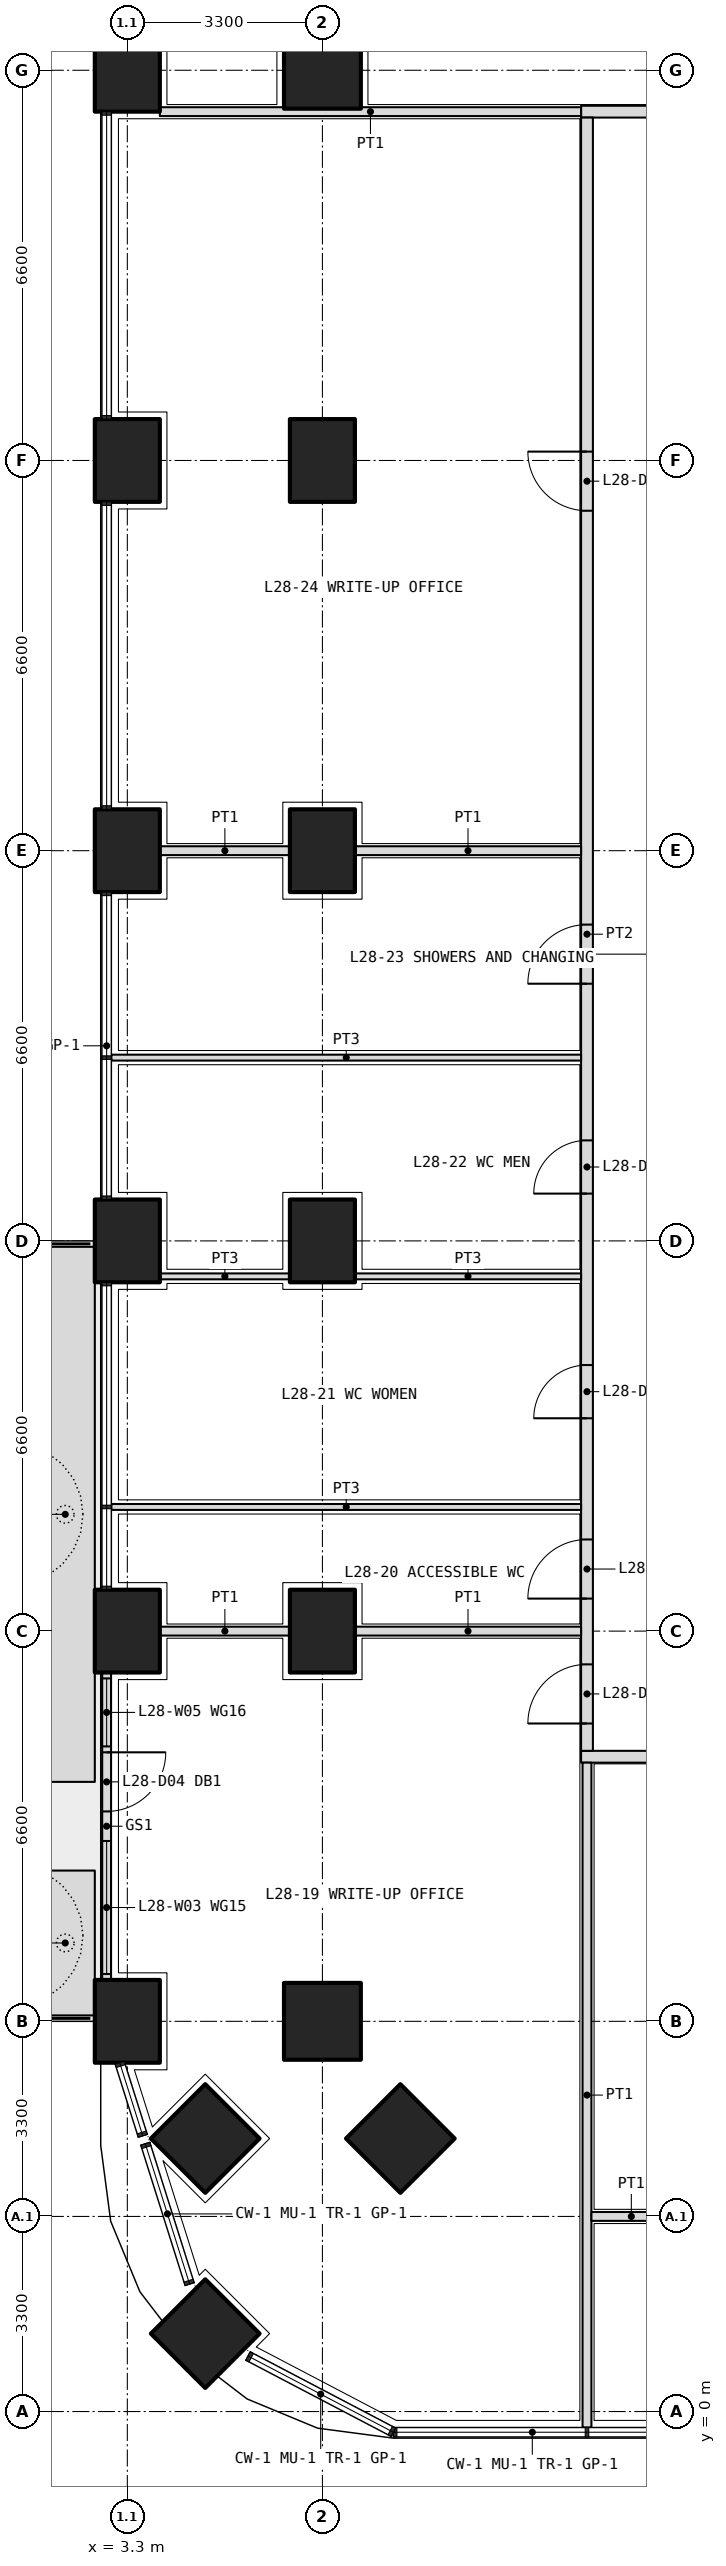
"""IFC4 building model, lengths in metres.
Left out: names, types, materials, properties, quantities, classifications, styles, units other than length and angle.
Written with IfcOpenShell. Run it as: python <this file> out.ifc"""

import sys

from ifc_helpers import new_model, si_unit, direction, frame, frame_2d, origin, origin_2d, place, context, subcontext, project, spatial, polyline, rectangle, outline, extrude, element, fill, save


model = new_model("IFC4")
c1 = context("Model", 3, precision=1e-05, world=origin(), true_north=direction((0.0, 1.0)))
c2 = subcontext(c1, "Body", "Model", "MODEL_VIEW")
j1 = project(units=[si_unit("LENGTHUNIT", "METRE"), si_unit("PLANEANGLEUNIT", "RADIAN")], contexts=[c1])
p1 = place(None, origin())
s1 = spatial("IfcSite", under=j1, at=p1, CompositionType="ELEMENT")
p2 = place(p1, origin())
s2 = spatial("IfcBuilding", under=s1, at=p2, CompositionType="ELEMENT")
p3 = place(p2, frame((0.0, 0.0, 124.2)))
s3 = spatial("IfcBuildingStorey", under=s2, at=p3, CompositionType="ELEMENT", Elevation=124.2)
p4 = place(p3, frame((4.618, 1.318, 0.0), z_axis=(0.0, 0.0, 1.0), x_axis=(0.707106781187, 0.707106781187, 0.0)))
e1 = element("IfcColumn", 1, at=p4, inside=s3, PredefinedType="COLUMN", context=c2, shape_type="SweptSolid", body=[
    extrude(rectangle(XDim=1.3, YDim=1.3, at=origin_2d()), origin(), (0.0, 0.0, 1.0), 4.2),
])
for number, where, z_axis, x_axis in (
    (2, (3.3, 6.6, 0.0), (0.0, 0.0, 1.0), (0.0, 1.0, 0.0)),
    (3, (3.3, 13.2, 0.0), (0.0, 0.0, 1.0), (0.0, 1.0, 0.0)),
    (4, (3.3, 19.8, 0.0), (0.0, 0.0, 1.0), (0.0, 1.0, 0.0)),
    (5, (3.3, 26.4, 0.0), (0.0, 0.0, 1.0), (0.0, 1.0, 0.0)),
    (6, (3.3, 33.0, 0.0), (0.0, 0.0, 1.0), (0.0, 1.0, 0.0)),
    (7, (3.3, 39.6, 0.0), (0.0, 0.0, 1.0), (0.0, 1.0, 0.0)),
):
    element("IfcColumn", number, at=place(p3, frame(where, z_axis=z_axis, x_axis=x_axis)), inside=s3, PredefinedType="COLUMN", context=c2, shape_type="SweptSolid", body=[
        extrude(rectangle(XDim=1.4, YDim=1.1, at=origin_2d()), origin(), (0.0, 0.0, 1.0), 4.2),
    ])
for number, where, z_axis, x_axis in (
    (8, (6.6, 6.6, 0.0), (0.0, 0.0, 1.0), (1.0, 0.0, 0.0)),
    (9, (6.6, 39.6, 0.0), (0.0, 0.0, 1.0), (1.0, 0.0, 0.0)),
    (10, (4.618, 4.618, 0.0), (0.0, 0.0, 1.0), (0.707, 0.707, 0.0)),
    (11, (7.918, 4.618, 0.0), (0.0, 0.0, 1.0), (0.707, 0.707, 0.0)),
):
    element("IfcColumn", number, at=place(p3, frame(where, z_axis=z_axis, x_axis=x_axis)), inside=s3, PredefinedType="COLUMN", context=c2, shape_type="SweptSolid", body=[
        extrude(rectangle(XDim=1.3, YDim=1.3, at=origin_2d()), origin(), (0.0, 0.0, 1.0), 4.2),
    ])
for number, where, z_axis, x_axis in (
    (12, (6.6, 13.2, 0.0), (0.0, 0.0, 1.0), (0.0, 1.0, 0.0)),
    (13, (6.6, 19.8, 0.0), (0.0, 0.0, 1.0), (0.0, 1.0, 0.0)),
    (14, (6.6, 26.4, 0.0), (0.0, 0.0, 1.0), (0.0, 1.0, 0.0)),
    (15, (6.6, 33.0, 0.0), (0.0, 0.0, 1.0), (0.0, 1.0, 0.0)),
):
    element("IfcColumn", number, at=place(p3, frame(where, z_axis=z_axis, x_axis=x_axis)), inside=s3, PredefinedType="COLUMN", context=c2, shape_type="SweptSolid", body=[
        extrude(rectangle(XDim=1.4, YDim=1.1, at=origin_2d()), origin(), (0.0, 0.0, 1.0), 4.2),
    ])
p5 = place(p3, origin())
e16 = element("IfcWall", 16, at=p5, inside=s3, PredefinedType="USERDEFINED", context=c2, shape_type="SweptSolid", body=[
    extrude(outline(polyline([(1.75, 6.7), (2.75, 6.7), (2.75, 9.15), (1.75, 9.15), (1.75, 6.7)]), holes=[polyline([(1.9, 6.85), (2.6, 6.85), (2.6, 9.0), (1.9, 9.0), (1.9, 6.85)])]), origin(), (0.0, 0.0, 1.0), 1.05),
])
p6 = place(p3, origin())
e17 = element("IfcWall", 17, at=p6, inside=s3, PredefinedType="USERDEFINED", context=c2, shape_type="SweptSolid", body=[
    extrude(outline(polyline([(1.75, 10.65), (2.75, 10.65), (2.75, 19.7), (1.75, 19.7), (1.75, 10.65)]), holes=[polyline([(1.9, 10.8), (2.6, 10.8), (2.6, 19.55), (1.9, 19.55), (1.9, 10.8)])]), origin(), (0.0, 0.0, 1.0), 1.05),
])
p7 = place(p3, frame((2.95, 12.5, 0.0), z_axis=(0.0, 0.0, 1.0), x_axis=(0.0, -1.0, 0.0)))
e18 = element("IfcWall", 18, at=p7, inside=s3, PredefinedType="SOLIDWALL", context=c2, shape_type="SweptSolid", body=[
    extrude(rectangle(XDim=5.2, YDim=0.15, at=frame_2d((2.6, 0.0))), origin(), (0.0, 0.0, 1.0), 2.7),
])
p8 = place(p7, frame((1.35, 0.0, 0.0)))
e19 = element("IfcOpeningElement", 19, at=p8, cuts=e18, PredefinedType="OPENING", context=c2, shape_type="SweptSolid", body=[
    extrude(rectangle(XDim=1.0, YDim=2.4, at=frame_2d((0.5, 1.2))), frame((0.0, 0.085, 0.0), z_axis=(0.0, -1.0, 0.0), x_axis=(1.0, 0.0, 0.0)), (0.0, 0.0, 1.0), 0.17),
])
p9 = place(p7, frame((0.1, 0.0, 0.1)))
e20 = element("IfcOpeningElement", 20, at=p9, cuts=e18, PredefinedType="OPENING", context=c2, shape_type="SweptSolid", body=[
    extrude(rectangle(XDim=1.15, YDim=2.3, at=frame_2d((0.575, 1.15))), frame((0.0, 0.085, 0.0), z_axis=(0.0, -1.0, 0.0), x_axis=(1.0, 0.0, 0.0)), (0.0, 0.0, 1.0), 0.17),
])
p10 = place(p7, frame((2.85, 0.0, 0.1)))
e21 = element("IfcOpeningElement", 21, at=p10, cuts=e18, PredefinedType="OPENING", context=c2, shape_type="SweptSolid", body=[
    extrude(rectangle(XDim=2.25, YDim=2.3, at=frame_2d((1.125, 1.15))), frame((0.0, 0.085, 0.0), z_axis=(0.0, -1.0, 0.0), x_axis=(1.0, 0.0, 0.0)), (0.0, 0.0, 1.0), 0.17),
])
p11 = place(p3, frame((10.975, 11.075, 0.0), z_axis=(0.0, 0.0, 1.0), x_axis=(1.0, 0.0, 0.0)))
e22 = element("IfcWall", 22, at=p11, inside=s3, PredefinedType="PARTITIONING", context=c2, shape_type="SweptSolid", body=[
    extrude(rectangle(XDim=30.85, YDim=0.2, at=frame_2d((15.425, 0.0))), origin(), (0.0, 0.0, 1.0), 2.85),
])
p12 = place(p11, frame((10.462, 0.0, 0.0)))
e23 = element("IfcOpeningElement", 23, at=p12, cuts=e22, PredefinedType="OPENING", context=c2, shape_type="SweptSolid", body=[
    extrude(rectangle(XDim=1.2, YDim=2.1, at=frame_2d((0.6, 1.05))), frame((0.0, 0.11, 0.0), z_axis=(0.0, -1.0, 0.0), x_axis=(1.0, 0.0, 0.0)), (0.0, 0.0, 1.0), 0.22),
])
p13 = place(p11, frame((23.625, 0.0, 0.0)))
e24 = element("IfcOpeningElement", 24, at=p13, cuts=e22, PredefinedType="OPENING", context=c2, shape_type="SweptSolid", body=[
    extrude(rectangle(XDim=1.0, YDim=2.1, at=frame_2d((0.5, 1.05))), frame((0.0, 0.11, 0.0), z_axis=(0.0, -1.0, 0.0), x_axis=(1.0, 0.0, 0.0)), (0.0, 0.0, 1.0), 0.22),
])
p14 = place(p11, frame((26.925, 0.0, 0.0)))
e25 = element("IfcOpeningElement", 25, at=p14, cuts=e22, PredefinedType="OPENING", context=c2, shape_type="SweptSolid", body=[
    extrude(rectangle(XDim=1.0, YDim=2.1, at=frame_2d((0.5, 1.05))), frame((0.0, 0.11, 0.0), z_axis=(0.0, -1.0, 0.0), x_axis=(1.0, 0.0, 0.0)), (0.0, 0.0, 1.0), 0.22),
])
p15 = place(p11, frame((29.087, 0.0, 0.0)))
e26 = element("IfcOpeningElement", 26, at=p15, cuts=e22, PredefinedType="OPENING", context=c2, shape_type="SweptSolid", body=[
    extrude(rectangle(XDim=1.2, YDim=2.1, at=frame_2d((0.6, 1.05))), frame((0.0, 0.11, 0.0), z_axis=(0.0, -1.0, 0.0), x_axis=(1.0, 0.0, 0.0)), (0.0, 0.0, 1.0), 0.22),
])
p16 = place(p3, frame((10.975, 38.9, 0.0), z_axis=(0.0, 0.0, 1.0), x_axis=(1.0, 0.0, 0.0)))
e27 = element("IfcWall", 27, at=p16, inside=s3, PredefinedType="PARTITIONING", context=c2, shape_type="SweptSolid", body=[
    extrude(rectangle(XDim=30.85, YDim=0.2, at=frame_2d((15.425, 0.0))), origin(), (0.0, 0.0, 1.0), 2.85),
])
p17 = place(p16, frame((12.113, 0.0, 0.0)))
e28 = element("IfcOpeningElement", 28, at=p17, cuts=e27, PredefinedType="OPENING", context=c2, shape_type="SweptSolid", body=[
    extrude(rectangle(XDim=1.2, YDim=2.1, at=frame_2d((0.6, 1.05))), frame((0.0, 0.11, 0.0), z_axis=(0.0, -1.0, 0.0), x_axis=(1.0, 0.0, 0.0)), (0.0, 0.0, 1.0), 0.22),
])
p18 = place(p16, frame((26.475, 0.0, 0.0)))
e29 = element("IfcOpeningElement", 29, at=p18, cuts=e27, PredefinedType="OPENING", context=c2, shape_type="SweptSolid", body=[
    extrude(rectangle(XDim=1.0, YDim=2.1, at=frame_2d((0.5, 1.05))), frame((0.0, 0.11, 0.0), z_axis=(0.0, -1.0, 0.0), x_axis=(1.0, 0.0, 0.0)), (0.0, 0.0, 1.0), 0.22),
])
p19 = place(p16, frame((29.188, 0.0, 0.0)))
e30 = element("IfcOpeningElement", 30, at=p19, cuts=e27, PredefinedType="OPENING", context=c2, shape_type="SweptSolid", body=[
    extrude(rectangle(XDim=1.0, YDim=2.1, at=frame_2d((0.5, 1.05))), frame((0.0, 0.11, 0.0), z_axis=(0.0, -1.0, 0.0), x_axis=(1.0, 0.0, 0.0)), (0.0, 0.0, 1.0), 0.22),
])
p20 = place(p3, frame((11.075, 11.175, 0.0), z_axis=(0.0, 0.0, 1.0), x_axis=(0.0, 1.0, 0.0)))
e31 = element("IfcWall", 31, at=p20, inside=s3, PredefinedType="PARTITIONING", context=c2, shape_type="SweptSolid", body=[
    extrude(rectangle(XDim=27.625, YDim=0.2, at=frame_2d((13.812, 0.0))), origin(), (0.0, 0.0, 1.0), 2.85),
])
p21 = place(p20, frame((0.462, 0.0, 0.0)))
e32 = element("IfcOpeningElement", 32, at=p21, cuts=e31, PredefinedType="OPENING", context=c2, shape_type="SweptSolid", body=[
    extrude(rectangle(XDim=1.0, YDim=2.1, at=frame_2d((0.5, 1.05))), frame((0.0, 0.11, 0.0), z_axis=(0.0, -1.0, 0.0), x_axis=(1.0, 0.0, 0.0)), (0.0, 0.0, 1.0), 0.22),
])
p22 = place(p20, frame((2.575, 0.0, 0.0)))
e33 = element("IfcOpeningElement", 33, at=p22, cuts=e31, PredefinedType="OPENING", context=c2, shape_type="SweptSolid", body=[
    extrude(rectangle(XDim=1.0, YDim=2.1, at=frame_2d((0.5, 1.05))), frame((0.0, 0.11, 0.0), z_axis=(0.0, -1.0, 0.0), x_axis=(1.0, 0.0, 0.0)), (0.0, 0.0, 1.0), 0.22),
])
p23 = place(p20, frame((5.625, 0.0, 0.0)))
e34 = element("IfcOpeningElement", 34, at=p23, cuts=e31, PredefinedType="OPENING", context=c2, shape_type="SweptSolid", body=[
    extrude(rectangle(XDim=0.9, YDim=2.1, at=frame_2d((0.45, 1.05))), frame((0.0, 0.11, 0.0), z_axis=(0.0, -1.0, 0.0), x_axis=(1.0, 0.0, 0.0)), (0.0, 0.0, 1.0), 0.22),
])
p24 = place(p20, frame((9.425, 0.0, 0.0)))
e35 = element("IfcOpeningElement", 35, at=p24, cuts=e31, PredefinedType="OPENING", context=c2, shape_type="SweptSolid", body=[
    extrude(rectangle(XDim=0.9, YDim=2.1, at=frame_2d((0.45, 1.05))), frame((0.0, 0.11, 0.0), z_axis=(0.0, -1.0, 0.0), x_axis=(1.0, 0.0, 0.0)), (0.0, 0.0, 1.0), 0.22),
])
p25 = place(p20, frame((12.975, 0.0, 0.0)))
e36 = element("IfcOpeningElement", 36, at=p25, cuts=e31, PredefinedType="OPENING", context=c2, shape_type="SweptSolid", body=[
    extrude(rectangle(XDim=1.0, YDim=2.1, at=frame_2d((0.5, 1.05))), frame((0.0, 0.11, 0.0), z_axis=(0.0, -1.0, 0.0), x_axis=(1.0, 0.0, 0.0)), (0.0, 0.0, 1.0), 0.22),
])
p26 = place(p20, frame((20.975, 0.0, 0.0)))
e37 = element("IfcOpeningElement", 37, at=p26, cuts=e31, PredefinedType="OPENING", context=c2, shape_type="SweptSolid", body=[
    extrude(rectangle(XDim=1.0, YDim=2.1, at=frame_2d((0.5, 1.05))), frame((0.0, 0.11, 0.0), z_axis=(0.0, -1.0, 0.0), x_axis=(1.0, 0.0, 0.0)), (0.0, 0.0, 1.0), 0.22),
])
p27 = place(p3, frame((11.075, -0.27, 0.0), z_axis=(0.0, 0.0, 1.0), x_axis=(0.0, 1.0, 0.0)))
e38 = element("IfcWall", 38, at=p27, inside=s3, PredefinedType="PARTITIONING", context=c2, shape_type="SweptSolid", body=[
    extrude(rectangle(XDim=11.245, YDim=0.15, at=frame_2d((5.623, 0.0))), origin(), (0.0, 0.0, 1.0), 2.7),
])
p28 = place(p3, frame((3.85, 38.9, 0.0), z_axis=(0.0, 0.0, 1.0), x_axis=(1.0, 0.0, 0.0)))
e39 = element("IfcWall", 39, at=p28, inside=s3, PredefinedType="PARTITIONING", context=c2, shape_type="SweptSolid", body=[
    extrude(rectangle(XDim=7.125, YDim=0.15, at=frame_2d((3.562, 0.0))), origin(), (0.0, 0.0, 1.0), 2.85),
])
p29 = place(p3, frame((11.15, 3.3, 0.0), z_axis=(0.0, 0.0, 1.0), x_axis=(1.0, 0.0, 0.0)))
e40 = element("IfcWall", 40, at=p29, inside=s3, PredefinedType="PARTITIONING", context=c2, shape_type="SweptSolid", body=[
    extrude(rectangle(XDim=1.35, YDim=0.15, at=frame_2d((0.675, 0.0))), origin(), (0.0, 0.0, 1.0), 2.85),
])
p30 = place(p3, frame((3.03, 15.3, 0.0), z_axis=(0.0, 0.0, 1.0), x_axis=(1.0, 0.0, 0.0)))
e41 = element("IfcWall", 41, at=p30, inside=s3, PredefinedType="PARTITIONING", context=c2, shape_type="SweptSolid", body=[
    extrude(rectangle(XDim=7.945, YDim=0.1, at=frame_2d((3.973, 0.0))), origin(), (0.0, 0.0, 1.0), 2.7),
])
p31 = place(p3, frame((3.85, 19.2, 0.0), z_axis=(0.0, 0.0, 1.0), x_axis=(1.0, 0.0, 0.0)))
e42 = element("IfcWall", 42, at=p31, inside=s3, PredefinedType="PARTITIONING", context=c2, shape_type="SweptSolid", body=[
    extrude(rectangle(XDim=2.2, YDim=0.1, at=frame_2d((1.1, 0.0))), origin(), (0.0, 0.0, 1.0), 2.85),
])
p32 = place(p3, frame((7.15, 19.2, 0.0), z_axis=(0.0, 0.0, 1.0), x_axis=(1.0, 0.0, 0.0)))
e43 = element("IfcWall", 43, at=p32, inside=s3, PredefinedType="PARTITIONING", context=c2, shape_type="SweptSolid", body=[
    extrude(rectangle(XDim=3.825, YDim=0.1, at=frame_2d((1.913, 0.0))), origin(), (0.0, 0.0, 1.0), 2.85),
])
p33 = place(p3, frame((3.03, 22.9, 0.0), z_axis=(0.0, 0.0, 1.0), x_axis=(1.0, 0.0, 0.0)))
e44 = element("IfcWall", 44, at=p33, inside=s3, PredefinedType="PARTITIONING", context=c2, shape_type="SweptSolid", body=[
    extrude(rectangle(XDim=7.945, YDim=0.1, at=frame_2d((3.973, 0.0))), origin(), (0.0, 0.0, 1.0), 2.7),
])
p34 = place(p3, frame((3.85, 13.2, 0.0), z_axis=(0.0, 0.0, 1.0), x_axis=(1.0, 0.0, 0.0)))
e45 = element("IfcWall", 45, at=p34, inside=s3, PredefinedType="PARTITIONING", context=c2, shape_type="SweptSolid", body=[
    extrude(rectangle(XDim=2.2, YDim=0.15, at=frame_2d((1.1, 0.0))), origin(), (0.0, 0.0, 1.0), 2.85),
])
p35 = place(p3, frame((7.15, 13.2, 0.0), z_axis=(0.0, 0.0, 1.0), x_axis=(1.0, 0.0, 0.0)))
e46 = element("IfcWall", 46, at=p35, inside=s3, PredefinedType="PARTITIONING", context=c2, shape_type="SweptSolid", body=[
    extrude(rectangle(XDim=3.825, YDim=0.15, at=frame_2d((1.913, 0.0))), origin(), (0.0, 0.0, 1.0), 2.85),
])
p36 = place(p3, frame((3.85, 26.4, 0.0), z_axis=(0.0, 0.0, 1.0), x_axis=(1.0, 0.0, 0.0)))
e47 = element("IfcWall", 47, at=p36, inside=s3, PredefinedType="PARTITIONING", context=c2, shape_type="SweptSolid", body=[
    extrude(rectangle(XDim=2.2, YDim=0.15, at=frame_2d((1.1, 0.0))), origin(), (0.0, 0.0, 1.0), 2.85),
])
p37 = place(p3, frame((7.15, 26.4, 0.0), z_axis=(0.0, 0.0, 1.0), x_axis=(1.0, 0.0, 0.0)))
e48 = element("IfcWall", 48, at=p37, inside=s3, PredefinedType="PARTITIONING", context=c2, shape_type="SweptSolid", body=[
    extrude(rectangle(XDim=3.825, YDim=0.15, at=frame_2d((1.913, 0.0))), origin(), (0.0, 0.0, 1.0), 2.85),
])
p38 = place(p8, origin())
e49 = element("IfcDoor", 49, at=p38, inside=s3, OperationType="SINGLE_SWING_LEFT", PredefinedType="DOOR", context=c2, shape_type="SweptSolid", body=[
    extrude(rectangle(XDim=1.0, YDim=2.4, at=frame_2d((0.5, 1.2))), frame((0.0, 0.025, 0.0), z_axis=(0.0, -1.0, 0.0), x_axis=(1.0, 0.0, 0.0)), (0.0, 0.0, 1.0), 0.05),
])
fill(e19, e49)
p39 = place(p9, origin())
e50 = element("IfcWindow", 50, at=p39, inside=s3, PartitioningType="SINGLE_PANEL", PredefinedType="WINDOW", context=c2, shape_type="SweptSolid", body=[
    extrude(rectangle(XDim=1.15, YDim=2.3, at=frame_2d((0.575, 1.15))), frame((0.0, 0.03, 0.0), z_axis=(0.0, -1.0, 0.0), x_axis=(1.0, 0.0, 0.0)), (0.0, 0.0, 1.0), 0.06),
])
fill(e20, e50)
p40 = place(p10, origin())
e51 = element("IfcWindow", 51, at=p40, inside=s3, PartitioningType="SINGLE_PANEL", PredefinedType="WINDOW", context=c2, shape_type="SweptSolid", body=[
    extrude(rectangle(XDim=2.25, YDim=2.3, at=frame_2d((1.125, 1.15))), frame((0.0, 0.03, 0.0), z_axis=(0.0, -1.0, 0.0), x_axis=(1.0, 0.0, 0.0)), (0.0, 0.0, 1.0), 0.06),
])
fill(e21, e51)
p41 = place(p21, origin())
e52 = element("IfcDoor", 52, at=p41, inside=s3, OperationType="SINGLE_SWING_LEFT", PredefinedType="DOOR", context=c2, shape_type="SweptSolid", body=[
    extrude(rectangle(XDim=1.0, YDim=2.1, at=frame_2d((0.5, 1.05))), frame((0.0, 0.025, 0.0), z_axis=(0.0, -1.0, 0.0), x_axis=(1.0, 0.0, 0.0)), (0.0, 0.0, 1.0), 0.05),
])
fill(e32, e52)
p42 = place(p22, origin())
e53 = element("IfcDoor", 53, at=p42, inside=s3, OperationType="SINGLE_SWING_LEFT", PredefinedType="DOOR", context=c2, shape_type="SweptSolid", body=[
    extrude(rectangle(XDim=1.0, YDim=2.1, at=frame_2d((0.5, 1.05))), frame((0.0, 0.025, 0.0), z_axis=(0.0, -1.0, 0.0), x_axis=(1.0, 0.0, 0.0)), (0.0, 0.0, 1.0), 0.05),
])
fill(e33, e53)
p43 = place(p23, origin())
e54 = element("IfcDoor", 54, at=p43, inside=s3, OperationType="SINGLE_SWING_LEFT", PredefinedType="DOOR", context=c2, shape_type="SweptSolid", body=[
    extrude(rectangle(XDim=0.9, YDim=2.1, at=frame_2d((0.45, 1.05))), frame((0.0, 0.025, 0.0), z_axis=(0.0, -1.0, 0.0), x_axis=(1.0, 0.0, 0.0)), (0.0, 0.0, 1.0), 0.05),
])
fill(e34, e54)
p44 = place(p24, origin())
e55 = element("IfcDoor", 55, at=p44, inside=s3, OperationType="SINGLE_SWING_LEFT", PredefinedType="DOOR", context=c2, shape_type="SweptSolid", body=[
    extrude(rectangle(XDim=0.9, YDim=2.1, at=frame_2d((0.45, 1.05))), frame((0.0, 0.025, 0.0), z_axis=(0.0, -1.0, 0.0), x_axis=(1.0, 0.0, 0.0)), (0.0, 0.0, 1.0), 0.05),
])
fill(e35, e55)
p45 = place(p25, origin())
e56 = element("IfcDoor", 56, at=p45, inside=s3, OperationType="SINGLE_SWING_LEFT", PredefinedType="DOOR", context=c2, shape_type="SweptSolid", body=[
    extrude(rectangle(XDim=1.0, YDim=2.1, at=frame_2d((0.5, 1.05))), frame((0.0, 0.025, 0.0), z_axis=(0.0, -1.0, 0.0), x_axis=(1.0, 0.0, 0.0)), (0.0, 0.0, 1.0), 0.05),
])
fill(e36, e56)
p46 = place(p26, origin())
e57 = element("IfcDoor", 57, at=p46, inside=s3, OperationType="SINGLE_SWING_RIGHT", PredefinedType="DOOR", context=c2, shape_type="SweptSolid", body=[
    extrude(rectangle(XDim=1.0, YDim=2.1, at=frame_2d((0.5, 1.05))), frame((0.0, 0.025, 0.0), z_axis=(0.0, -1.0, 0.0), x_axis=(1.0, 0.0, 0.0)), (0.0, 0.0, 1.0), 0.05),
])
fill(e37, e57)
save(model, sys.argv[1])
